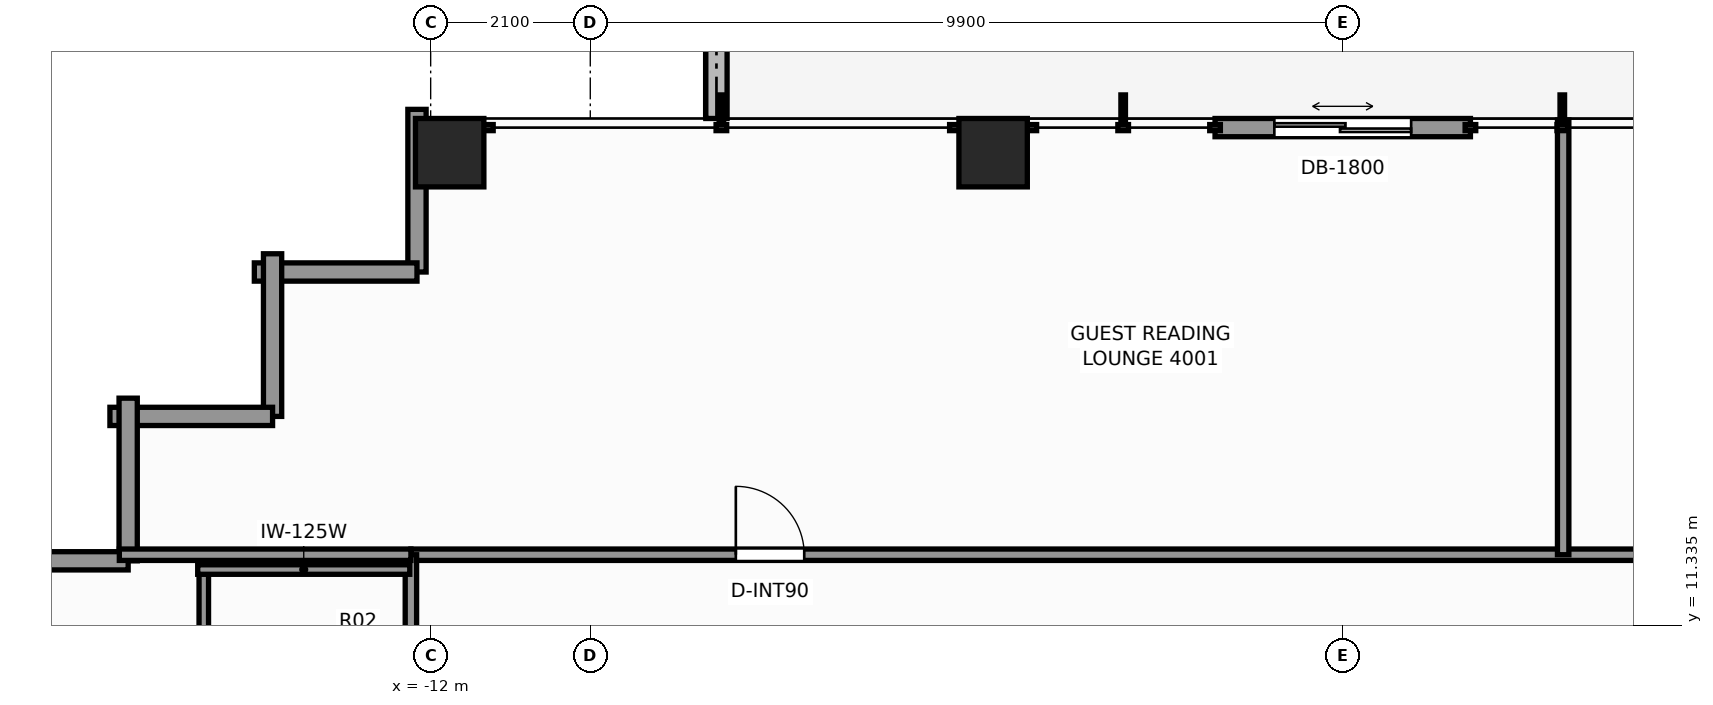
"""IFC4 building model, lengths in metres.
Left out: names, types, materials, properties, quantities, classifications, styles, units other than length and angle.
Written with IfcOpenShell. Run it as: python <this file> out.ifc"""

import sys

from ifc_helpers import new_model, si_unit, direction, frame, frame_2d, origin, origin_2d, place, context, subcontext, project, spatial, rectangle, extrude, element, fill, save


model = new_model("IFC4")
c1 = context("Model", 3, precision=1e-05, world=origin(), true_north=direction((0.0, 1.0)))
c2 = subcontext(c1, "Body", "Model", "MODEL_VIEW")
j1 = project(units=[si_unit("LENGTHUNIT", "METRE"), si_unit("PLANEANGLEUNIT", "RADIAN")], contexts=[c1])
p1 = place(None, origin())
s1 = spatial("IfcSite", under=j1, at=p1, CompositionType="ELEMENT")
p2 = place(p1, origin())
s2 = spatial("IfcBuilding", under=s1, at=p2, CompositionType="ELEMENT")
p3 = place(p2, frame((0.0, 0.0, 138.2)))
s3 = spatial("IfcBuildingStorey", under=s2, at=p3, CompositionType="ELEMENT", Elevation=138.2)
for number, where, z_axis, x_axis in (
    (1, (-11.75, 17.55, 0.0), (0.0, 0.0, 1.0), (1.0, 0.0, 0.0)),
    (2, (-4.6, 17.55, 0.0), (0.0, 0.0, 1.0), (1.0, 0.0, 0.0)),
):
    element("IfcColumn", number, at=place(p3, frame(where, z_axis=z_axis, x_axis=x_axis)), inside=s3, PredefinedType="COLUMN", context=c2, shape_type="SweptSolid", body=[
        extrude(rectangle(XDim=0.9, YDim=0.9, at=origin_2d()), origin(), (0.0, 0.0, 1.0), 3.3),
    ])
p4 = place(p3, frame((-8.24, 19.705, -0.02), z_axis=(0.0, 0.0, 1.0), x_axis=(0.0, -1.0, 0.0)))
e3 = element("IfcWall", 3, at=p4, inside=s3, PredefinedType="PARAPET", context=c2, shape_type="SweptSolid", body=[
    extrude(rectangle(XDim=1.705, YDim=0.28, at=frame_2d((0.853, 0.0))), origin(), (0.0, 0.0, 1.0), 0.42),
])
p5 = place(p3, frame((-1.68, 17.88, 0.0), z_axis=(0.0, 0.0, 1.0), x_axis=(1.0, 0.0, 0.0)))
e4 = element("IfcWall", 4, at=p5, inside=s3, PredefinedType="STANDARD", context=c2, shape_type="SweptSolid", body=[
    extrude(rectangle(XDim=3.36, YDim=0.24, at=frame_2d((1.68, 0.0))), origin(), (0.0, 0.0, 1.0), 3.1),
])
p6 = place(p5, frame((0.78, 0.0, 0.0)))
e5 = element("IfcOpeningElement", 5, at=p6, cuts=e4, PredefinedType="OPENING", context=c2, shape_type="SweptSolid", body=[
    extrude(rectangle(XDim=1.8, YDim=2.2, at=frame_2d((0.9, 1.1))), frame((0.0, 0.13, 0.0), z_axis=(0.0, -1.0, 0.0), x_axis=(1.0, 0.0, 0.0)), (0.0, 0.0, 1.0), 0.26),
])
for number, where, z_axis, x_axis in (
    (6, (-12.18, 15.98, 0.0), (0.0, 0.0, 1.0), (0.0, 1.0, 0.0)),
    (7, (-14.32, 15.98, 0.0), (0.0, 0.0, 1.0), (1.0, 0.0, 0.0)),
):
    element("IfcWall", number, at=place(p3, frame(where, z_axis=z_axis, x_axis=x_axis)), inside=s3, PredefinedType="STANDARD", context=c2, shape_type="SweptSolid", body=[
        extrude(rectangle(XDim=2.14, YDim=0.24, at=frame_2d((1.07, 0.0))), origin(), (0.0, 0.0, 1.0), 2.479),
    ])
for number, where, z_axis, x_axis in (
    (8, (-14.08, 14.08, 0.0), (0.0, 0.0, 1.0), (0.0, 1.0, 0.0)),
    (9, (-16.22, 14.08, 0.0), (0.0, 0.0, 1.0), (1.0, 0.0, 0.0)),
):
    element("IfcWall", number, at=place(p3, frame(where, z_axis=z_axis, x_axis=x_axis)), inside=s3, PredefinedType="STANDARD", context=c2, shape_type="SweptSolid", body=[
        extrude(rectangle(XDim=2.14, YDim=0.24, at=frame_2d((1.07, 0.0))), origin(), (0.0, 0.0, 1.0), 2.479),
    ])
for number, where, z_axis, x_axis in (
    (10, (-15.98, 12.18, 0.0), (0.0, 0.0, 1.0), (0.0, 1.0, 0.0)),
    (11, (-18.12, 12.18, 0.0), (0.0, 0.0, 1.0), (1.0, 0.0, 0.0)),
):
    element("IfcWall", number, at=place(p3, frame(where, z_axis=z_axis, x_axis=x_axis)), inside=s3, PredefinedType="STANDARD", context=c2, shape_type="SweptSolid", body=[
        extrude(rectangle(XDim=2.14, YDim=0.24, at=frame_2d((1.07, 0.0))), origin(), (0.0, 0.0, 1.0), 2.479),
    ])
p7 = place(p3, frame((-12.26, 12.26, 0.0), z_axis=(0.0, 0.0, 1.0), x_axis=(1.0, 0.0, 0.0)))
e12 = element("IfcWall", 12, at=p7, inside=s3, PredefinedType="PARTITIONING", context=c2, shape_type="SweptSolid", body=[
    extrude(rectangle(XDim=24.68, YDim=0.15, at=frame_2d((12.34, 0.0))), origin(), (0.0, 0.0, 1.0), 2.312),
])
p8 = place(p7, frame((4.275, 0.0, 0.0)))
e13 = element("IfcOpeningElement", 13, at=p8, cuts=e12, PredefinedType="OPENING", context=c2, shape_type="SweptSolid", body=[
    extrude(rectangle(XDim=0.9, YDim=2.06, at=frame_2d((0.45, 1.03))), frame((0.0, 0.085, 0.0), z_axis=(0.0, -1.0, 0.0), x_axis=(1.0, 0.0, 0.0)), (0.0, 0.0, 1.0), 0.17),
])
p9 = place(p7, frame((19.345, 0.0, 0.0)))
e14 = element("IfcOpeningElement", 14, at=p9, cuts=e12, PredefinedType="OPENING", context=c2, shape_type="SweptSolid", body=[
    extrude(rectangle(XDim=0.9, YDim=2.06, at=frame_2d((0.45, 1.03))), frame((0.0, 0.085, 0.0), z_axis=(0.0, -1.0, 0.0), x_axis=(1.0, 0.0, 0.0)), (0.0, 0.0, 1.0), 0.17),
])
p10 = place(p3, frame((-12.26, 7.4, 0.0), z_axis=(0.0, 0.0, 1.0), x_axis=(0.0, 1.0, 0.0)))
e15 = element("IfcWall", 15, at=p10, inside=s3, PredefinedType="PARTITIONING", context=c2, shape_type="SweptSolid", body=[
    extrude(rectangle(XDim=4.86, YDim=0.15, at=frame_2d((2.43, 0.0))), origin(), (0.0, 0.0, 1.0), 2.312),
])
p11 = place(p10, frame((0.683, 0.0, 0.0)))
e16 = element("IfcOpeningElement", 16, at=p11, cuts=e15, PredefinedType="OPENING", context=c2, shape_type="SweptSolid", body=[
    extrude(rectangle(XDim=0.95, YDim=2.06, at=frame_2d((0.475, 1.03))), frame((0.0, 0.085, 0.0), z_axis=(0.0, -1.0, 0.0), x_axis=(1.0, 0.0, 0.0)), (0.0, 0.0, 1.0), 0.17),
])
p12 = place(p3, frame((-16.096, 12.26, 0.0), z_axis=(0.0, 0.0, 1.0), x_axis=(1.0, 0.0, 0.0)))
e17 = element("IfcWall", 17, at=p12, inside=s3, PredefinedType="PARTITIONING", context=c2, shape_type="SweptSolid", body=[
    extrude(rectangle(XDim=3.836, YDim=0.15, at=frame_2d((1.918, 0.0))), origin(), (0.0, 0.0, 1.0), 3.1),
])
p13 = place(p3, frame((2.9, 12.26, 0.0), z_axis=(0.0, 0.0, 1.0), x_axis=(0.0, 1.0, 0.0)))
e18 = element("IfcWall", 18, at=p13, inside=s3, PredefinedType="PARTITIONING", context=c2, shape_type="SweptSolid", body=[
    extrude(rectangle(XDim=5.72, YDim=0.15, at=frame_2d((2.86, 0.0))), origin(), (0.0, 0.0, 1.0), 2.469),
])
p14 = place(p3, frame((-14.985, 9.755, 0.0), z_axis=(0.0, 0.0, 1.0), x_axis=(0.0, 1.0, 0.0)))
e19 = element("IfcWall", 19, at=p14, inside=s3, PredefinedType="PARTITIONING", context=c2, shape_type="SweptSolid", body=[
    extrude(rectangle(XDim=2.37, YDim=0.125, at=frame_2d((1.185, 0.0))), origin(), (0.0, 0.0, 1.0), 2.312),
])
p15 = place(p3, frame((-15.065, 12.065, 0.0), z_axis=(0.0, 0.0, 1.0), x_axis=(1.0, 0.0, 0.0)))
e20 = element("IfcWall", 20, at=p15, inside=s3, PredefinedType="PARTITIONING", context=c2, shape_type="SweptSolid", body=[
    extrude(rectangle(XDim=2.79, YDim=0.125, at=frame_2d((1.395, 0.0))), origin(), (0.0, 0.0, 1.0), 3.1),
])
p16 = place(p6, origin())
e21 = element("IfcDoor", 21, at=p16, inside=s3, OperationType="DOUBLE_DOOR_SLIDING", PredefinedType="DOOR", context=c2, shape_type="SweptSolid", body=[
    extrude(rectangle(XDim=1.8, YDim=2.2, at=frame_2d((0.9, 1.1))), frame((0.0, 0.025, 0.0), z_axis=(0.0, -1.0, 0.0), x_axis=(1.0, 0.0, 0.0)), (0.0, 0.0, 1.0), 0.05),
])
fill(e5, e21)
p17 = place(p8, origin())
e22 = element("IfcDoor", 22, at=p17, inside=s3, OperationType="SINGLE_SWING_LEFT", PredefinedType="DOOR", context=c2, shape_type="SweptSolid", body=[
    extrude(rectangle(XDim=0.9, YDim=2.06, at=frame_2d((0.45, 1.03))), frame((0.0, 0.025, 0.0), z_axis=(0.0, -1.0, 0.0), x_axis=(1.0, 0.0, 0.0)), (0.0, 0.0, 1.0), 0.05),
])
fill(e13, e22)
save(model, sys.argv[1])
